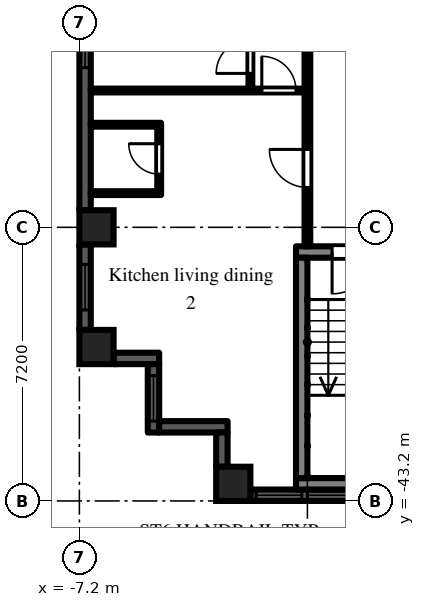
"""IFC4 building model, lengths in metres.
Left out: names, types, materials, properties, quantities, classifications, styles, units other than length and angle.
Written with IfcOpenShell. Run it as: python <this file> out.ifc"""

import sys

from ifc_helpers import new_model, si_unit, direction, frame, frame_2d, origin, origin_2d, place, context, subcontext, project, spatial, rectangle, extrude, element, fill, save


model = new_model("IFC4")
c1 = context("Model", 3, precision=1e-05, world=origin(), true_north=direction((0.0, 1.0)))
c2 = subcontext(c1, "Body", "Model", "MODEL_VIEW")
j1 = project(units=[si_unit("LENGTHUNIT", "METRE"), si_unit("PLANEANGLEUNIT", "RADIAN")], contexts=[c1])
p1 = place(None, origin())
s1 = spatial("IfcSite", under=j1, at=p1, CompositionType="ELEMENT")
p2 = place(p1, origin())
s2 = spatial("IfcBuilding", under=s1, at=p2, CompositionType="ELEMENT")
p3 = place(p2, frame((0.0, 0.0, 84.9)))
s3 = spatial("IfcBuildingStorey", under=s2, at=p3, CompositionType="ELEMENT", Elevation=84.9)
for number, where, z_axis, x_axis in (
    (1, (-6.75, -39.15, 0.0), (0.0, 0.0, 1.0), (1.0, 0.0, 0.0)),
    (2, (-6.75, -36.0, 0.0), (0.0, 0.0, 1.0), (1.0, 0.0, 0.0)),
    (3, (-3.15, -42.75, 0.0), (0.0, 0.0, 1.0), (1.0, 0.0, 0.0)),
):
    element("IfcColumn", number, at=place(p3, frame(where, z_axis=z_axis, x_axis=x_axis)), inside=s3, PredefinedType="COLUMN", context=c2, shape_type="SweptSolid", body=[
        extrude(rectangle(XDim=0.9, YDim=0.9, at=origin_2d()), origin(), (0.0, 0.0, 1.0), 3.0),
    ])
p4 = place(p3, frame((-7.05, -29.25, 0.0), z_axis=(0.0, 0.0, 1.0), x_axis=(0.0, -1.0, 0.0)))
e4 = element("IfcWall", 4, at=p4, inside=s3, PredefinedType="SOLIDWALL", context=c2, shape_type="SweptSolid", body=[
    extrude(rectangle(XDim=6.3, YDim=0.3, at=frame_2d((3.15, 0.0))), origin(), (0.0, 0.0, 1.0), 2.1),
])
p5 = place(p4, frame((0.15, 0.0, 0.2)))
e5 = element("IfcOpeningElement", 5, at=p5, cuts=e4, PredefinedType="OPENING", context=c2, shape_type="SweptSolid", body=[
    extrude(rectangle(XDim=2.4, YDim=1.85, at=frame_2d((1.2, 0.925))), frame((0.0, 0.16, 0.0), z_axis=(0.0, -1.0, 0.0), x_axis=(1.0, 0.0, 0.0)), (0.0, 0.0, 1.0), 0.32),
])
p6 = place(p3, frame((-7.05, -36.45, 0.0), z_axis=(0.0, 0.0, 1.0), x_axis=(0.0, -1.0, 0.0)))
e6 = element("IfcWall", 6, at=p6, inside=s3, PredefinedType="SOLIDWALL", context=c2, shape_type="SweptSolid", body=[
    extrude(rectangle(XDim=2.25, YDim=0.3, at=frame_2d((1.125, 0.0))), origin(), (0.0, 0.0, 1.0), 2.1),
])
p7 = place(p6, frame((0.525, 0.0, 0.2)))
e7 = element("IfcOpeningElement", 7, at=p7, cuts=e6, PredefinedType="OPENING", context=c2, shape_type="SweptSolid", body=[
    extrude(rectangle(XDim=1.2, YDim=1.85, at=frame_2d((0.6, 0.925))), frame((0.0, 0.16, 0.0), z_axis=(0.0, -1.0, 0.0), x_axis=(1.0, 0.0, 0.0)), (0.0, 0.0, 1.0), 0.32),
])
p8 = place(p3, frame((-6.3, -39.45, 0.0), z_axis=(0.0, 0.0, 1.0), x_axis=(1.0, 0.0, 0.0)))
e8 = element("IfcWall", 8, at=p8, inside=s3, PredefinedType="SOLIDWALL", context=c2, shape_type="SweptSolid", body=[
    extrude(rectangle(XDim=1.2, YDim=0.3, at=frame_2d((0.6, 0.0))), origin(), (0.0, 0.0, 1.0), 2.575),
])
p9 = place(p3, frame((-5.25, -39.6, 0.0), z_axis=(0.0, 0.0, 1.0), x_axis=(0.0, -1.0, 0.0)))
e9 = element("IfcWall", 9, at=p9, inside=s3, PredefinedType="SOLIDWALL", context=c2, shape_type="SweptSolid", body=[
    extrude(rectangle(XDim=1.8, YDim=0.3, at=frame_2d((0.9, 0.0))), origin(), (0.0, 0.0, 1.0), 2.575),
])
p10 = place(p9, frame((0.3, 0.0, 0.2)))
e10 = element("IfcOpeningElement", 10, at=p10, cuts=e9, PredefinedType="OPENING", context=c2, shape_type="SweptSolid", body=[
    extrude(rectangle(XDim=1.2, YDim=1.85, at=frame_2d((0.6, 0.925))), frame((0.0, 0.16, 0.0), z_axis=(0.0, -1.0, 0.0), x_axis=(1.0, 0.0, 0.0)), (0.0, 0.0, 1.0), 0.32),
])
p11 = place(p3, frame((-5.1, -41.25, 0.0), z_axis=(0.0, 0.0, 1.0), x_axis=(1.0, 0.0, 0.0)))
e11 = element("IfcWall", 11, at=p11, inside=s3, PredefinedType="SOLIDWALL", context=c2, shape_type="SweptSolid", body=[
    extrude(rectangle(XDim=1.8, YDim=0.3, at=frame_2d((0.9, 0.0))), origin(), (0.0, 0.0, 1.0), 2.575),
])
p12 = place(p3, frame((-3.45, -41.4, 0.0), z_axis=(0.0, 0.0, 1.0), x_axis=(0.0, -1.0, 0.0)))
e12 = element("IfcWall", 12, at=p12, inside=s3, PredefinedType="SOLIDWALL", context=c2, shape_type="SweptSolid", body=[
    extrude(rectangle(XDim=0.9, YDim=0.3, at=frame_2d((0.45, 0.0))), origin(), (0.0, 0.0, 1.0), 2.575),
])
p13 = place(p3, frame((-2.7, -43.05, 0.0), z_axis=(0.0, 0.0, 1.0), x_axis=(1.0, 0.0, 0.0)))
e13 = element("IfcWall", 13, at=p13, inside=s3, PredefinedType="SOLIDWALL", context=c2, shape_type="SweptSolid", body=[
    extrude(rectangle(XDim=5.4, YDim=0.3, at=frame_2d((2.7, 0.0))), origin(), (0.0, 0.0, 1.0), 2.1),
])
p14 = place(p13, frame((1.5, 0.0, 0.2)))
e14 = element("IfcOpeningElement", 14, at=p14, cuts=e13, PredefinedType="OPENING", context=c2, shape_type="SweptSolid", body=[
    extrude(rectangle(XDim=2.4, YDim=1.85, at=frame_2d((1.2, 0.925))), frame((0.0, 0.16, 0.0), z_axis=(0.0, -1.0, 0.0), x_axis=(1.0, 0.0, 0.0)), (0.0, 0.0, 1.0), 0.32),
])
p15 = place(p13, frame((0.15, 0.0, 0.2)))
e15 = element("IfcOpeningElement", 15, at=p15, cuts=e13, PredefinedType="OPENING", context=c2, shape_type="SweptSolid", body=[
    extrude(rectangle(XDim=1.2, YDim=1.85, at=frame_2d((0.6, 0.925))), frame((0.0, 0.16, 0.0), z_axis=(0.0, -1.0, 0.0), x_axis=(1.0, 0.0, 0.0)), (0.0, 0.0, 1.0), 0.32),
])
p16 = place(p13, frame((4.05, 0.0, 0.2)))
e16 = element("IfcOpeningElement", 16, at=p16, cuts=e13, PredefinedType="OPENING", context=c2, shape_type="SweptSolid", body=[
    extrude(rectangle(XDim=1.2, YDim=1.85, at=frame_2d((0.6, 0.925))), frame((0.0, 0.16, 0.0), z_axis=(0.0, -1.0, 0.0), x_axis=(1.0, 0.0, 0.0)), (0.0, 0.0, 1.0), 0.32),
])
p17 = place(p3, frame((-1.5, -36.65, 0.0), z_axis=(0.0, 0.0, 1.0), x_axis=(1.0, 0.0, 0.0)))
e17 = element("IfcWall", 17, at=p17, inside=s3, PredefinedType="SHEAR", context=c2, shape_type="SweptSolid", body=[
    extrude(rectangle(XDim=3.0, YDim=0.3, at=frame_2d((1.5, 0.0))), origin(), (0.0, 0.0, 1.0), 2.575),
])
p18 = place(p17, frame((0.95, 0.0, 0.0)))
e18 = element("IfcOpeningElement", 18, at=p18, cuts=e17, PredefinedType="OPENING", context=c2, shape_type="SweptSolid", body=[
    extrude(rectangle(XDim=1.1, YDim=2.1, at=frame_2d((0.55, 1.05))), frame((0.0, 0.16, 0.0), z_axis=(0.0, -1.0, 0.0), x_axis=(1.0, 0.0, 0.0)), (0.0, 0.0, 1.0), 0.32),
])
p19 = place(p3, frame((-1.5, -42.75, 0.0), z_axis=(0.0, 0.0, 1.0), x_axis=(1.0, 0.0, 0.0)))
e19 = element("IfcWall", 19, at=p19, inside=s3, PredefinedType="SHEAR", context=c2, shape_type="SweptSolid", body=[
    extrude(rectangle(XDim=3.0, YDim=0.3, at=frame_2d((1.5, 0.0))), origin(), (0.0, 0.0, 1.0), 2.575),
])
p20 = place(p3, frame((-1.35, -36.8, 0.0), z_axis=(0.0, 0.0, 1.0), x_axis=(0.0, -1.0, 0.0)))
e20 = element("IfcWall", 20, at=p20, inside=s3, PredefinedType="SHEAR", context=c2, shape_type="SweptSolid", body=[
    extrude(rectangle(XDim=5.8, YDim=0.3, at=frame_2d((2.9, 0.0))), origin(), (0.0, 0.0, 1.0), 2.575),
])
for number, where, z_axis, x_axis in (
    (21, (-6.9, -35.1, 0.0), (0.0, 0.0, 1.0), (1.0, 0.0, 0.0)),
    (22, (-6.9, -33.3, 0.0), (0.0, 0.0, 1.0), (1.0, 0.0, 0.0)),
):
    element("IfcWall", number, at=place(p3, frame(where, z_axis=z_axis, x_axis=x_axis)), inside=s3, PredefinedType="PARTITIONING", context=c2, shape_type="SweptSolid", body=[
        extrude(rectangle(XDim=1.85, YDim=0.1, at=frame_2d((0.925, 0.0))), origin(), (0.0, 0.0, 1.0), 2.575),
    ])
p21 = place(p3, frame((-6.9, -32.4, 0.0), z_axis=(0.0, 0.0, 1.0), x_axis=(1.0, 0.0, 0.0)))
e23 = element("IfcWall", 23, at=p21, inside=s3, PredefinedType="PARTITIONING", context=c2, shape_type="SweptSolid", body=[
    extrude(rectangle(XDim=5.625, YDim=0.1, at=frame_2d((2.812, 0.0))), origin(), (0.0, 0.0, 1.0), 2.575),
])
p22 = place(p21, frame((4.5, 0.0, 0.0)))
e24 = element("IfcOpeningElement", 24, at=p22, cuts=e23, PredefinedType="OPENING", context=c2, shape_type="SweptSolid", body=[
    extrude(rectangle(XDim=0.9, YDim=2.1, at=frame_2d((0.45, 1.05))), frame((0.0, 0.06, 0.0), z_axis=(0.0, -1.0, 0.0), x_axis=(1.0, 0.0, 0.0)), (0.0, 0.0, 1.0), 0.12),
])
p23 = place(p3, frame((-5.1, -35.05, 0.0), z_axis=(0.0, 0.0, 1.0), x_axis=(0.0, 1.0, 0.0)))
e25 = element("IfcWall", 25, at=p23, inside=s3, PredefinedType="PARTITIONING", context=c2, shape_type="SweptSolid", body=[
    extrude(rectangle(XDim=1.7, YDim=0.1, at=frame_2d((0.85, 0.0))), origin(), (0.0, 0.0, 1.0), 2.575),
])
p24 = place(p23, frame((0.45, 0.0, 0.0)))
e26 = element("IfcOpeningElement", 26, at=p24, cuts=e25, PredefinedType="OPENING", context=c2, shape_type="SweptSolid", body=[
    extrude(rectangle(XDim=0.8, YDim=2.1, at=frame_2d((0.4, 1.05))), frame((0.0, 0.06, 0.0), z_axis=(0.0, -1.0, 0.0), x_axis=(1.0, 0.0, 0.0)), (0.0, 0.0, 1.0), 0.12),
])
p25 = place(p3, frame((-2.7, -32.35, 0.0), z_axis=(0.0, 0.0, 1.0), x_axis=(0.0, 1.0, 0.0)))
e27 = element("IfcWall", 27, at=p25, inside=s3, PredefinedType="PARTITIONING", context=c2, shape_type="SweptSolid", body=[
    extrude(rectangle(XDim=14.3, YDim=0.1, at=frame_2d((7.15, 0.0))), origin(), (0.0, 0.0, 1.0), 2.575),
])
p26 = place(p25, frame((0.4, 0.0, 0.0)))
e28 = element("IfcOpeningElement", 28, at=p26, cuts=e27, PredefinedType="OPENING", context=c2, shape_type="SweptSolid", body=[
    extrude(rectangle(XDim=0.9, YDim=2.1, at=frame_2d((0.45, 1.05))), frame((0.0, 0.06, 0.0), z_axis=(0.0, -1.0, 0.0), x_axis=(1.0, 0.0, 0.0)), (0.0, 0.0, 1.0), 0.12),
])
p27 = place(p25, frame((5.8, 0.0, 0.0)))
e29 = element("IfcOpeningElement", 29, at=p27, cuts=e27, PredefinedType="OPENING", context=c2, shape_type="SweptSolid", body=[
    extrude(rectangle(XDim=0.9, YDim=2.1, at=frame_2d((0.45, 1.05))), frame((0.0, 0.06, 0.0), z_axis=(0.0, -1.0, 0.0), x_axis=(1.0, 0.0, 0.0)), (0.0, 0.0, 1.0), 0.12),
])
p28 = place(p25, frame((7.6, 0.0, 0.0)))
e30 = element("IfcOpeningElement", 30, at=p28, cuts=e27, PredefinedType="OPENING", context=c2, shape_type="SweptSolid", body=[
    extrude(rectangle(XDim=0.9, YDim=2.1, at=frame_2d((0.45, 1.05))), frame((0.0, 0.06, 0.0), z_axis=(0.0, -1.0, 0.0), x_axis=(1.0, 0.0, 0.0)), (0.0, 0.0, 1.0), 0.12),
])
p29 = place(p25, frame((13.0, 0.0, 0.0)))
e31 = element("IfcOpeningElement", 31, at=p29, cuts=e27, PredefinedType="OPENING", context=c2, shape_type="SweptSolid", body=[
    extrude(rectangle(XDim=0.9, YDim=2.1, at=frame_2d((0.45, 1.05))), frame((0.0, 0.06, 0.0), z_axis=(0.0, -1.0, 0.0), x_axis=(1.0, 0.0, 0.0)), (0.0, 0.0, 1.0), 0.12),
])
p30 = place(p3, frame((-1.2, -36.5, 0.0), z_axis=(0.0, 0.0, 1.0), x_axis=(0.0, 1.0, 0.0)))
e32 = element("IfcWall", 32, at=p30, inside=s3, PredefinedType="PARTITIONING", context=c2, shape_type="SweptSolid", body=[
    extrude(rectangle(XDim=35.225, YDim=0.15, at=frame_2d((17.613, 0.0))), origin(), (0.0, 0.0, 1.0), 2.575),
])
p31 = place(p30, frame((30.75, 0.0, 0.0)))
e33 = element("IfcOpeningElement", 33, at=p31, cuts=e32, PredefinedType="OPENING", context=c2, shape_type="SweptSolid", body=[
    extrude(rectangle(XDim=0.9, YDim=2.1, at=frame_2d((0.45, 1.05))), frame((0.0, 0.085, 0.0), z_axis=(0.0, -1.0, 0.0), x_axis=(1.0, 0.0, 0.0)), (0.0, 0.0, 1.0), 0.17),
])
p32 = place(p30, frame((27.05, 0.0, 0.0)))
e34 = element("IfcOpeningElement", 34, at=p32, cuts=e32, PredefinedType="OPENING", context=c2, shape_type="SweptSolid", body=[
    extrude(rectangle(XDim=0.9, YDim=2.1, at=frame_2d((0.45, 1.05))), frame((0.0, 0.085, 0.0), z_axis=(0.0, -1.0, 0.0), x_axis=(1.0, 0.0, 0.0)), (0.0, 0.0, 1.0), 0.17),
])
p33 = place(p30, frame((19.85, 0.0, 0.0)))
e35 = element("IfcOpeningElement", 35, at=p33, cuts=e32, PredefinedType="OPENING", context=c2, shape_type="SweptSolid", body=[
    extrude(rectangle(XDim=0.9, YDim=2.1, at=frame_2d((0.45, 1.05))), frame((0.0, 0.085, 0.0), z_axis=(0.0, -1.0, 0.0), x_axis=(1.0, 0.0, 0.0)), (0.0, 0.0, 1.0), 0.17),
])
p34 = place(p30, frame((1.55, 0.0, 0.0)))
e36 = element("IfcOpeningElement", 36, at=p34, cuts=e32, PredefinedType="OPENING", context=c2, shape_type="SweptSolid", body=[
    extrude(rectangle(XDim=1.0, YDim=2.1, at=frame_2d((0.5, 1.05))), frame((0.0, 0.085, 0.0), z_axis=(0.0, -1.0, 0.0), x_axis=(1.0, 0.0, 0.0)), (0.0, 0.0, 1.0), 0.17),
])
p35 = place(p5, origin())
e37 = element("IfcWindow", 37, at=p35, inside=s3, PartitioningType="SINGLE_PANEL", PredefinedType="WINDOW", context=c2, shape_type="SweptSolid", body=[
    extrude(rectangle(XDim=2.4, YDim=1.85, at=frame_2d((1.2, 0.925))), frame((0.0, 0.03, 0.0), z_axis=(0.0, -1.0, 0.0), x_axis=(1.0, 0.0, 0.0)), (0.0, 0.0, 1.0), 0.06),
])
fill(e5, e37)
p36 = place(p7, origin())
e38 = element("IfcWindow", 38, at=p36, inside=s3, PartitioningType="SINGLE_PANEL", PredefinedType="WINDOW", context=c2, shape_type="SweptSolid", body=[
    extrude(rectangle(XDim=1.2, YDim=1.85, at=frame_2d((0.6, 0.925))), frame((0.0, 0.03, 0.0), z_axis=(0.0, -1.0, 0.0), x_axis=(1.0, 0.0, 0.0)), (0.0, 0.0, 1.0), 0.06),
])
fill(e7, e38)
p37 = place(p10, origin())
e39 = element("IfcWindow", 39, at=p37, inside=s3, PartitioningType="SINGLE_PANEL", PredefinedType="WINDOW", context=c2, shape_type="SweptSolid", body=[
    extrude(rectangle(XDim=1.2, YDim=1.85, at=frame_2d((0.6, 0.925))), frame((0.0, 0.03, 0.0), z_axis=(0.0, -1.0, 0.0), x_axis=(1.0, 0.0, 0.0)), (0.0, 0.0, 1.0), 0.06),
])
fill(e10, e39)
p38 = place(p14, origin())
e40 = element("IfcWindow", 40, at=p38, inside=s3, PartitioningType="SINGLE_PANEL", PredefinedType="WINDOW", context=c2, shape_type="SweptSolid", body=[
    extrude(rectangle(XDim=2.4, YDim=1.85, at=frame_2d((1.2, 0.925))), frame((0.0, 0.03, 0.0), z_axis=(0.0, -1.0, 0.0), x_axis=(1.0, 0.0, 0.0)), (0.0, 0.0, 1.0), 0.06),
])
fill(e14, e40)
p39 = place(p15, origin())
e41 = element("IfcWindow", 41, at=p39, inside=s3, PartitioningType="SINGLE_PANEL", PredefinedType="WINDOW", context=c2, shape_type="SweptSolid", body=[
    extrude(rectangle(XDim=1.2, YDim=1.85, at=frame_2d((0.6, 0.925))), frame((0.0, 0.03, 0.0), z_axis=(0.0, -1.0, 0.0), x_axis=(1.0, 0.0, 0.0)), (0.0, 0.0, 1.0), 0.06),
])
fill(e15, e41)
p40 = place(p18, frame((1.1, 0.0, 0.0), z_axis=(0.0, 0.0, 1.0), x_axis=(-1.0, 0.0, 0.0)))
e42 = element("IfcDoor", 42, at=p40, inside=s3, OperationType="SINGLE_SWING_RIGHT", PredefinedType="DOOR", context=c2, shape_type="SweptSolid", body=[
    extrude(rectangle(XDim=1.1, YDim=2.1, at=frame_2d((0.55, 1.05))), frame((0.0, 0.025, 0.0), z_axis=(0.0, -1.0, 0.0), x_axis=(1.0, 0.0, 0.0)), (0.0, 0.0, 1.0), 0.05),
])
fill(e18, e42)
p41 = place(p24, origin())
e43 = element("IfcDoor", 43, at=p41, inside=s3, OperationType="SINGLE_SWING_RIGHT", PredefinedType="DOOR", context=c2, shape_type="SweptSolid", body=[
    extrude(rectangle(XDim=0.8, YDim=2.1, at=frame_2d((0.4, 1.05))), frame((0.0, 0.025, 0.0), z_axis=(0.0, -1.0, 0.0), x_axis=(1.0, 0.0, 0.0)), (0.0, 0.0, 1.0), 0.05),
])
fill(e26, e43)
p42 = place(p34, origin())
e44 = element("IfcDoor", 44, at=p42, inside=s3, OperationType="SINGLE_SWING_RIGHT", PredefinedType="DOOR", context=c2, shape_type="SweptSolid", body=[
    extrude(rectangle(XDim=1.0, YDim=2.1, at=frame_2d((0.5, 1.05))), frame((0.0, 0.025, 0.0), z_axis=(0.0, -1.0, 0.0), x_axis=(1.0, 0.0, 0.0)), (0.0, 0.0, 1.0), 0.05),
])
fill(e36, e44)
p43 = place(p26, origin())
e45 = element("IfcDoor", 45, at=p43, inside=s3, OperationType="SINGLE_SWING_LEFT", PredefinedType="DOOR", context=c2, shape_type="SweptSolid", body=[
    extrude(rectangle(XDim=0.9, YDim=2.1, at=frame_2d((0.45, 1.05))), frame((0.0, 0.025, 0.0), z_axis=(0.0, -1.0, 0.0), x_axis=(1.0, 0.0, 0.0)), (0.0, 0.0, 1.0), 0.05),
])
fill(e28, e45)
p44 = place(p22, origin())
e46 = element("IfcDoor", 46, at=p44, inside=s3, OperationType="SINGLE_SWING_LEFT", PredefinedType="DOOR", context=c2, shape_type="SweptSolid", body=[
    extrude(rectangle(XDim=0.9, YDim=2.1, at=frame_2d((0.45, 1.05))), frame((0.0, 0.025, 0.0), z_axis=(0.0, -1.0, 0.0), x_axis=(1.0, 0.0, 0.0)), (0.0, 0.0, 1.0), 0.05),
])
fill(e24, e46)
save(model, sys.argv[1])
